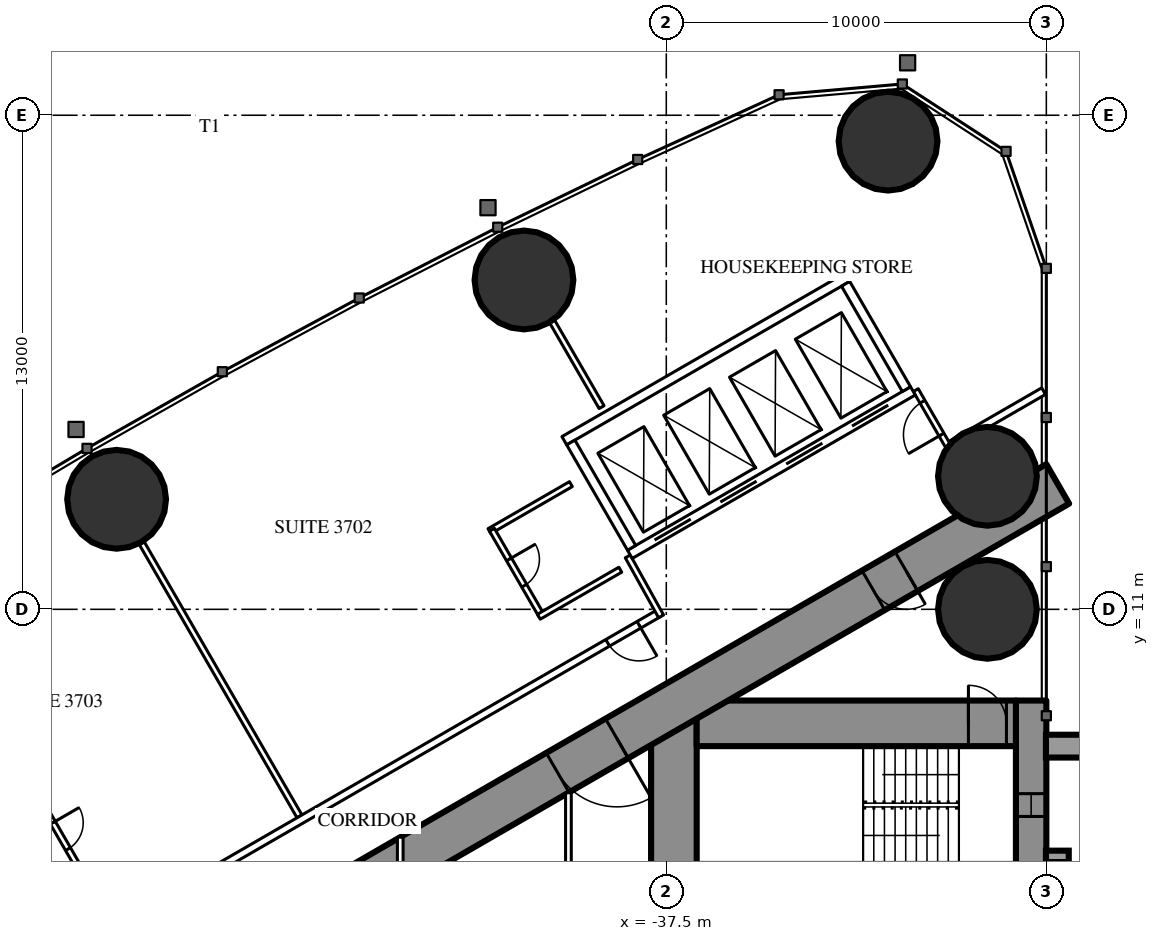
"""IFC4 building model, lengths in metres.
Left out: names, types, materials, properties, quantities, classifications, styles, units other than length and angle.
Written with IfcOpenShell. Run it as: python <this file> out.ifc"""

import sys

from ifc_helpers import new_model, si_unit, direction, frame, frame_2d, origin, origin_2d, place, context, subcontext, project, spatial, rectangle, hollow_circle, extrude, element, fill, save


model = new_model("IFC4")
c1 = context("Model", 3, precision=1e-05, world=origin(), true_north=direction((0.0, 1.0)))
c2 = subcontext(c1, "Body", "Model", "MODEL_VIEW")
j1 = project(units=[si_unit("LENGTHUNIT", "METRE"), si_unit("PLANEANGLEUNIT", "RADIAN")], contexts=[c1])
p1 = place(None, origin())
s1 = spatial("IfcSite", under=j1, at=p1, CompositionType="ELEMENT")
p2 = place(p1, origin())
s2 = spatial("IfcBuilding", under=s1, at=p2, CompositionType="ELEMENT")
p3 = place(p2, frame((0.0, 0.0, 139.6)))
s3 = spatial("IfcBuildingStorey", under=s2, at=p3, CompositionType="ELEMENT", Elevation=139.6)
for number, where, z_axis, x_axis in (
    (1, (-31.665, 23.318, 0.0), (0.0, 0.0, 1.0), (1.0, 0.0, 0.0)),
    (2, (-29.05, 11.0, 0.0), (0.0, 0.0, 1.0), (1.0, 0.0, 0.0)),
    (3, (-29.05, 14.5, 0.0), (0.0, 0.0, 1.0), (1.0, 0.0, 0.0)),
    (4, (-41.245, 19.666, 0.0), (0.0, 0.0, 1.0), (1.0, 0.0, 0.0)),
    (5, (-51.963, 13.895, 0.0), (0.0, 0.0, 1.0), (1.0, 0.0, 0.0)),
):
    element("IfcColumn", number, at=place(p3, frame(where, z_axis=z_axis, x_axis=x_axis)), inside=s3, PredefinedType="COLUMN", context=c2, shape_type="SweptSolid", body=[
        extrude(hollow_circle(Radius=1.3, WallThickness=0.1, at=origin_2d()), origin(), (0.0, 0.0, 1.0), 3.5),
    ])
p4 = place(p3, frame((-27.9, 8.6, 0.0), z_axis=(0.0, 0.0, 1.0), x_axis=(0.0, -1.0, 0.0)))
e6 = element("IfcWall", 6, at=p4, inside=s3, PredefinedType="SHEAR", context=c2, shape_type="SweptSolid", body=[
    extrude(rectangle(XDim=17.2, YDim=0.8, at=frame_2d((8.6, 0.0))), origin(), (0.0, 0.0, 1.0), 3.5),
])
p5 = place(p4, frame((2.45, 0.0, 0.6)))
e7 = element("IfcOpeningElement", 7, at=p5, cuts=e6, PredefinedType="OPENING", context=c2, shape_type="SweptSolid", body=[
    extrude(rectangle(XDim=0.6, YDim=2.1, at=frame_2d((0.3, 1.05))), frame((0.0, 0.41, 0.0), z_axis=(0.0, -1.0, 0.0), x_axis=(1.0, 0.0, 0.0)), (0.0, 0.0, 1.0), 0.82),
])
p6 = place(p4, frame((14.15, 0.0, 0.6)))
e8 = element("IfcOpeningElement", 8, at=p6, cuts=e6, PredefinedType="OPENING", context=c2, shape_type="SweptSolid", body=[
    extrude(rectangle(XDim=0.6, YDim=2.1, at=frame_2d((0.3, 1.05))), frame((0.0, 0.41, 0.0), z_axis=(0.0, -1.0, 0.0), x_axis=(1.0, 0.0, 0.0)), (0.0, 0.0, 1.0), 0.82),
])
p7 = place(p3, frame((-37.3, 8.6, 0.0), z_axis=(0.0, 0.0, 1.0), x_axis=(0.0, -1.0, 0.0)))
e9 = element("IfcWall", 9, at=p7, inside=s3, PredefinedType="SHEAR", context=c2, shape_type="SweptSolid", body=[
    extrude(rectangle(XDim=17.2, YDim=1.2, at=frame_2d((8.6, 0.0))), origin(), (0.0, 0.0, 1.0), 3.5),
])
p8 = place(p7, frame((7.7, 0.0, 0.0)))
e10 = element("IfcOpeningElement", 10, at=p8, cuts=e9, PredefinedType="OPENING", context=c2, shape_type="SweptSolid", body=[
    extrude(rectangle(XDim=1.8, YDim=2.2, at=frame_2d((0.9, 1.1))), frame((0.0, 0.61, 0.0), z_axis=(0.0, -1.0, 0.0), x_axis=(1.0, 0.0, 0.0)), (0.0, 0.0, 1.0), 1.22),
])
p9 = place(p3, frame((-28.3, 8.0, 0.0), z_axis=(0.0, 0.0, 1.0), x_axis=(-1.0, 0.0, 0.0)))
e11 = element("IfcWall", 11, at=p9, inside=s3, PredefinedType="SHEAR", context=c2, shape_type="SweptSolid", body=[
    extrude(rectangle(XDim=8.4, YDim=1.2, at=frame_2d((4.2, 0.0))), origin(), (0.0, 0.0, 1.0), 3.5),
])
p10 = place(p9, frame((0.25, 0.0, 0.0)))
e12 = element("IfcOpeningElement", 12, at=p10, cuts=e11, PredefinedType="OPENING", context=c2, shape_type="SweptSolid", body=[
    extrude(rectangle(XDim=1.0, YDim=2.2, at=frame_2d((0.5, 1.1))), frame((0.0, 0.61, 0.0), z_axis=(0.0, -1.0, 0.0), x_axis=(1.0, 0.0, 0.0)), (0.0, 0.0, 1.0), 1.22),
])
p11 = place(p3, frame((-27.2, 14.3, 0.0), z_axis=(0.0, 0.0, 1.0), x_axis=(-0.866026593062, -0.499997940104, 0.0)))
e13 = element("IfcWall", 13, at=p11, inside=s3, PredefinedType="SHEAR", context=c2, shape_type="SweptSolid", body=[
    extrude(rectangle(XDim=28.946, YDim=1.2, at=frame_2d((14.473, 0.0))), origin(), (0.0, 0.0, 1.0), 3.5),
])
p12 = place(p11, frame((4.6, 0.0, 0.0)))
e14 = element("IfcOpeningElement", 14, at=p12, cuts=e13, PredefinedType="OPENING", context=c2, shape_type="SweptSolid", body=[
    extrude(rectangle(XDim=1.0, YDim=2.2, at=frame_2d((0.5, 1.1))), frame((0.0, 0.61, 0.0), z_axis=(0.0, -1.0, 0.0), x_axis=(1.0, 0.0, 0.0)), (0.0, 0.0, 1.0), 1.22),
])
p13 = place(p11, frame((13.395, 0.0, 0.0)))
e15 = element("IfcOpeningElement", 15, at=p13, cuts=e13, PredefinedType="OPENING", context=c2, shape_type="SweptSolid", body=[
    extrude(rectangle(XDim=1.8, YDim=2.2, at=frame_2d((0.9, 1.1))), frame((0.0, 0.61, 0.0), z_axis=(0.0, -1.0, 0.0), x_axis=(1.0, 0.0, 0.0)), (0.0, 0.0, 1.0), 1.22),
])
p14 = place(p3, frame((-47.151, 5.552, 0.0), z_axis=(0.0, 0.0, 1.0), x_axis=(-0.500003012045, 0.866023664773, 0.0)))
e16 = element("IfcWall", 16, at=p14, inside=s3, PredefinedType="PARTITIONING", context=c2, shape_type="SweptSolid", body=[
    extrude(rectangle(XDim=8.311, YDim=0.15, at=frame_2d((4.156, 0.0))), origin(), (0.0, 0.0, 1.0), 2.2),
])
p15 = place(p3, frame((-39.202, 16.32, 0.0), z_axis=(0.0, 0.0, 1.0), x_axis=(-0.499947391036, 0.866055775454, 0.0)))
e17 = element("IfcWall", 17, at=p15, inside=s3, PredefinedType="PARTITIONING", context=c2, shape_type="SweptSolid", body=[
    extrude(rectangle(XDim=2.599, YDim=0.15, at=frame_2d((1.3, 0.0))), origin(), (0.0, 0.0, 1.0), 3.25),
])
p16 = place(p3, frame((-27.572, 16.741, 0.0), z_axis=(0.0, 0.0, 1.0), x_axis=(-0.866034618596, -0.499984039138, 0.0)))
e18 = element("IfcWall", 18, at=p16, inside=s3, PredefinedType="PARTITIONING", context=c2, shape_type="SweptSolid", body=[
    extrude(rectangle(XDim=2.854, YDim=0.2, at=frame_2d((1.427, 0.0))), origin(), (0.0, 0.0, 1.0), 3.25),
])
p17 = place(p3, frame((-37.7, 10.894, 0.0), z_axis=(0.0, 0.0, 1.0), x_axis=(-0.866027905338, -0.499995667157, 0.0)))
e19 = element("IfcWall", 19, at=p17, inside=s3, PredefinedType="PARTITIONING", context=c2, shape_type="SweptSolid", body=[
    extrude(rectangle(XDim=21.787, YDim=0.2, at=frame_2d((10.894, 0.0))), origin(), (0.0, 0.0, 1.0), 3.25),
])
p18 = place(p17, frame((17.711, 0.0, 0.0)))
e20 = element("IfcOpeningElement", 20, at=p18, cuts=e19, PredefinedType="OPENING", context=c2, shape_type="SweptSolid", body=[
    extrude(rectangle(XDim=0.95, YDim=2.2, at=frame_2d((0.475, 1.1))), frame((0.0, 0.11, 0.0), z_axis=(0.0, -1.0, 0.0), x_axis=(1.0, 0.0, 0.0)), (0.0, 0.0, 1.0), 0.22),
])
p19 = place(p17, frame((19.399, 0.0, 0.0)))
e21 = element("IfcOpeningElement", 21, at=p19, cuts=e19, PredefinedType="OPENING", context=c2, shape_type="SweptSolid", body=[
    extrude(rectangle(XDim=1.8, YDim=2.2, at=frame_2d((0.9, 1.1))), frame((0.0, 0.11, 0.0), z_axis=(0.0, -1.0, 0.0), x_axis=(1.0, 0.0, 0.0)), (0.0, 0.0, 1.0), 0.22),
])
p20 = place(p17, frame((0.6, 0.0, 0.0)))
e22 = element("IfcOpeningElement", 22, at=p20, cuts=e19, PredefinedType="OPENING", context=c2, shape_type="SweptSolid", body=[
    extrude(rectangle(XDim=0.95, YDim=2.2, at=frame_2d((0.475, 1.1))), frame((0.0, 0.11, 0.0), z_axis=(0.0, -1.0, 0.0), x_axis=(1.0, 0.0, 0.0)), (0.0, 0.0, 1.0), 0.22),
])
p21 = place(p3, frame((-38.513, 12.392, 0.0), z_axis=(0.0, 0.0, 1.0), x_axis=(0.485585508183, -0.874189175317, 0.0)))
e23 = element("IfcWall", 23, at=p21, inside=s3, PredefinedType="PARTITIONING", context=c2, shape_type="SweptSolid", body=[
    extrude(rectangle(XDim=1.805, YDim=0.15, at=frame_2d((0.902, 0.0))), origin(), (0.0, 0.0, 1.0), 3.25),
])
p22 = place(p3, frame((-30.033, 15.205, 0.0), z_axis=(0.0, 0.0, 1.0), x_axis=(-0.499980071345, 0.866036909293, 0.0)))
e24 = element("IfcWall", 24, at=p22, inside=s3, PredefinedType="PARTITIONING", context=c2, shape_type="SweptSolid", body=[
    extrude(rectangle(XDim=1.805, YDim=0.15, at=frame_2d((0.902, 0.0))), origin(), (0.0, 0.0, 1.0), 3.25),
])
p23 = place(p22, frame((0.452, 0.0, 0.0)))
e25 = element("IfcOpeningElement", 25, at=p23, cuts=e24, PredefinedType="OPENING", context=c2, shape_type="SweptSolid", body=[
    extrude(rectangle(XDim=1.0, YDim=2.2, at=frame_2d((0.5, 1.1))), frame((0.0, 0.085, 0.0), z_axis=(0.0, -1.0, 0.0), x_axis=(1.0, 0.0, 0.0)), (0.0, 0.0, 1.0), 0.17),
])
p24 = place(p3, frame((-52.792, 3.912, 0.0), z_axis=(0.0, 0.0, 1.0), x_axis=(-0.500006934395, 0.866021400173, 0.0)))
e26 = element("IfcWall", 26, at=p24, inside=s3, PredefinedType="PARTITIONING", context=c2, shape_type="SweptSolid", body=[
    extrude(rectangle(XDim=2.6, YDim=0.15, at=frame_2d((1.3, 0.0))), origin(), (0.0, 0.0, 1.0), 3.25),
])
p25 = place(p24, frame((0.9, 0.0, 0.0)))
e27 = element("IfcOpeningElement", 27, at=p25, cuts=e26, PredefinedType="OPENING", context=c2, shape_type="SweptSolid", body=[
    extrude(rectangle(XDim=0.8, YDim=2.2, at=frame_2d((0.4, 1.1))), frame((0.0, 0.085, 0.0), z_axis=(0.0, -1.0, 0.0), x_axis=(1.0, 0.0, 0.0)), (0.0, 0.0, 1.0), 0.17),
])
p26 = place(p3, frame((-40.01, 14.294, 0.0), z_axis=(0.0, 0.0, 1.0), x_axis=(-0.866031185235, -0.4999899861, 0.0)))
e28 = element("IfcWall", 28, at=p26, inside=s3, PredefinedType="PARTITIONING", context=c2, shape_type="SweptSolid", body=[
    extrude(rectangle(XDim=2.475, YDim=0.15, at=frame_2d((1.238, 0.0))), origin(), (0.0, 0.0, 1.0), 3.25),
])
p27 = place(p3, frame((-40.788, 10.843, 0.0), z_axis=(0.0, 0.0, 1.0), x_axis=(-0.500006934395, 0.866021400173, 0.0)))
e29 = element("IfcWall", 29, at=p27, inside=s3, PredefinedType="PARTITIONING", context=c2, shape_type="SweptSolid", body=[
    extrude(rectangle(XDim=2.6, YDim=0.15, at=frame_2d((1.3, 0.0))), origin(), (0.0, 0.0, 1.0), 3.25),
])
p28 = place(p27, frame((0.9, 0.0, 0.0)))
e30 = element("IfcOpeningElement", 30, at=p28, cuts=e29, PredefinedType="OPENING", context=c2, shape_type="SweptSolid", body=[
    extrude(rectangle(XDim=0.8, YDim=2.2, at=frame_2d((0.4, 1.1))), frame((0.0, 0.085, 0.0), z_axis=(0.0, -1.0, 0.0), x_axis=(1.0, 0.0, 0.0)), (0.0, 0.0, 1.0), 0.17),
])
p29 = place(p3, frame((-38.71, 12.042, 0.0), z_axis=(0.0, 0.0, 1.0), x_axis=(-0.86604923931, -0.499958713387, 0.0)))
e31 = element("IfcWall", 31, at=p29, inside=s3, PredefinedType="PARTITIONING", context=c2, shape_type="SweptSolid", body=[
    extrude(rectangle(XDim=2.475, YDim=0.15, at=frame_2d((1.237, 0.0))), origin(), (0.0, 0.0, 1.0), 3.25),
])
p30 = place(p3, frame((-40.075, 6.174, 0.0), z_axis=(0.0, 0.0, 1.0), x_axis=(0.0, -1.0, 0.0)))
e32 = element("IfcWall", 32, at=p30, inside=s3, PredefinedType="PARTITIONING", context=c2, shape_type="SweptSolid", body=[
    extrude(rectangle(XDim=7.374, YDim=0.15, at=frame_2d((3.687, 0.0))), origin(), (0.0, 0.0, 1.0), 3.25),
])
p31 = place(p30, frame((2.787, 0.0, 0.0)))
e33 = element("IfcOpeningElement", 33, at=p31, cuts=e32, PredefinedType="OPENING", context=c2, shape_type="SweptSolid", body=[
    extrude(rectangle(XDim=1.8, YDim=2.2, at=frame_2d((0.9, 1.1))), frame((0.0, 0.085, 0.0), z_axis=(0.0, -1.0, 0.0), x_axis=(1.0, 0.0, 0.0)), (0.0, 0.0, 1.0), 0.17),
])
p32 = place(p3, frame((-44.5, 5.005, 0.0), z_axis=(0.0, 0.0, 1.0), x_axis=(0.0, -1.0, 0.0)))
e34 = element("IfcWall", 34, at=p32, inside=s3, PredefinedType="PARTITIONING", context=c2, shape_type="SweptSolid", body=[
    extrude(rectangle(XDim=10.009, YDim=0.15, at=frame_2d((5.005, 0.0))), origin(), (0.0, 0.0, 1.0), 2.45),
])
p33 = place(p32, frame((4.505, 0.0, 0.0)))
e35 = element("IfcOpeningElement", 35, at=p33, cuts=e34, PredefinedType="OPENING", context=c2, shape_type="SweptSolid", body=[
    extrude(rectangle(XDim=1.0, YDim=2.2, at=frame_2d((0.5, 1.1))), frame((0.0, 0.085, 0.0), z_axis=(0.0, -1.0, 0.0), x_axis=(1.0, 0.0, 0.0)), (0.0, 0.0, 1.0), 0.17),
])
p34 = place(p3, frame((-31.01, 16.747, 0.0), z_axis=(0.0, 0.0, 1.0), x_axis=(-0.866028165386, -0.499995216735, 0.0)))
e36 = element("IfcWall", 36, at=p34, inside=s3, PredefinedType="PARTITIONING", context=c2, shape_type="SweptSolid", body=[
    extrude(rectangle(XDim=8.6, YDim=0.25, at=frame_2d((4.3, 0.0))), origin(), (0.0, 0.0, 1.0), 3.25),
])
p35 = place(p34, frame((0.75, 0.0, 0.0)))
e37 = element("IfcOpeningElement", 37, at=p35, cuts=e36, PredefinedType="OPENING", context=c2, shape_type="SweptSolid", body=[
    extrude(rectangle(XDim=1.1, YDim=2.2, at=frame_2d((0.55, 1.1))), frame((0.0, 0.135, 0.0), z_axis=(0.0, -1.0, 0.0), x_axis=(1.0, 0.0, 0.0)), (0.0, 0.0, 1.0), 0.27),
])
p36 = place(p34, frame((2.75, 0.0, 0.0)))
e38 = element("IfcOpeningElement", 38, at=p36, cuts=e36, PredefinedType="OPENING", context=c2, shape_type="SweptSolid", body=[
    extrude(rectangle(XDim=1.1, YDim=2.2, at=frame_2d((0.55, 1.1))), frame((0.0, 0.135, 0.0), z_axis=(0.0, -1.0, 0.0), x_axis=(1.0, 0.0, 0.0)), (0.0, 0.0, 1.0), 0.27),
])
p37 = place(p34, frame((4.75, 0.0, 0.0)))
e39 = element("IfcOpeningElement", 39, at=p37, cuts=e36, PredefinedType="OPENING", context=c2, shape_type="SweptSolid", body=[
    extrude(rectangle(XDim=1.1, YDim=2.2, at=frame_2d((0.55, 1.1))), frame((0.0, 0.135, 0.0), z_axis=(0.0, -1.0, 0.0), x_axis=(1.0, 0.0, 0.0)), (0.0, 0.0, 1.0), 0.27),
])
p38 = place(p34, frame((6.75, 0.0, 0.0)))
e40 = element("IfcOpeningElement", 40, at=p38, cuts=e36, PredefinedType="OPENING", context=c2, shape_type="SweptSolid", body=[
    extrude(rectangle(XDim=1.1, YDim=2.2, at=frame_2d((0.55, 1.1))), frame((0.0, 0.135, 0.0), z_axis=(0.0, -1.0, 0.0), x_axis=(1.0, 0.0, 0.0)), (0.0, 0.0, 1.0), 0.27),
])
p39 = place(p3, frame((-32.736, 19.736, 0.0), z_axis=(0.0, 0.0, 1.0), x_axis=(-0.866028165386, -0.499995216735, 0.0)))
e41 = element("IfcWall", 41, at=p39, inside=s3, PredefinedType="PARTITIONING", context=c2, shape_type="SweptSolid", body=[
    extrude(rectangle(XDim=8.6, YDim=0.25, at=frame_2d((4.3, 0.0))), origin(), (0.0, 0.0, 1.0), 3.25),
])
p40 = place(p3, frame((-31.181, 16.793, 0.0), z_axis=(0.0, 0.0, 1.0), x_axis=(-0.499929347863, 0.866066190972, 0.0)))
e42 = element("IfcWall", 42, at=p40, inside=s3, PredefinedType="PARTITIONING", context=c2, shape_type="SweptSolid", body=[
    extrude(rectangle(XDim=3.201, YDim=0.25, at=frame_2d((1.6, 0.0))), origin(), (0.0, 0.0, 1.0), 3.25),
])
p41 = place(p3, frame((-38.413, 12.618, 0.0), z_axis=(0.0, 0.0, 1.0), x_axis=(-0.499872130319, 0.866099216793, 0.0)))
e43 = element("IfcWall", 43, at=p41, inside=s3, PredefinedType="PARTITIONING", context=c2, shape_type="SweptSolid", body=[
    extrude(rectangle(XDim=3.2, YDim=0.25, at=frame_2d((1.6, 0.0))), origin(), (0.0, 0.0, 1.0), 3.25),
])
p42 = place(p25, origin())
e44 = element("IfcDoor", 44, at=p42, inside=s3, OperationType="SINGLE_SWING_RIGHT", PredefinedType="DOOR", context=c2, shape_type="SweptSolid", body=[
    extrude(rectangle(XDim=0.8, YDim=2.2, at=frame_2d((0.4, 1.1))), frame((0.0, 0.025, 0.0), z_axis=(0.0, -1.0, 0.0), x_axis=(1.0, 0.0, 0.0)), (0.0, 0.0, 1.0), 0.05),
])
fill(e27, e44)
p43 = place(p28, origin())
e45 = element("IfcDoor", 45, at=p43, inside=s3, OperationType="SINGLE_SWING_RIGHT", PredefinedType="DOOR", context=c2, shape_type="SweptSolid", body=[
    extrude(rectangle(XDim=0.8, YDim=2.2, at=frame_2d((0.4, 1.1))), frame((0.0, 0.025, 0.0), z_axis=(0.0, -1.0, 0.0), x_axis=(1.0, 0.0, 0.0)), (0.0, 0.0, 1.0), 0.05),
])
fill(e30, e45)
p44 = place(p20, origin())
e46 = element("IfcDoor", 46, at=p44, inside=s3, OperationType="SINGLE_SWING_LEFT", PredefinedType="DOOR", context=c2, shape_type="SweptSolid", body=[
    extrude(rectangle(XDim=0.95, YDim=2.2, at=frame_2d((0.475, 1.1))), frame((0.0, 0.025, 0.0), z_axis=(0.0, -1.0, 0.0), x_axis=(1.0, 0.0, 0.0)), (0.0, 0.0, 1.0), 0.05),
])
fill(e22, e46)
p45 = place(p23, origin())
e47 = element("IfcDoor", 47, at=p45, inside=s3, OperationType="SINGLE_SWING_LEFT", PredefinedType="DOOR", context=c2, shape_type="SweptSolid", body=[
    extrude(rectangle(XDim=1.0, YDim=2.2, at=frame_2d((0.5, 1.1))), frame((0.0, 0.025, 0.0), z_axis=(0.0, -1.0, 0.0), x_axis=(1.0, 0.0, 0.0)), (0.0, 0.0, 1.0), 0.05),
])
fill(e25, e47)
p46 = place(p12, origin())
e48 = element("IfcDoor", 48, at=p46, inside=s3, OperationType="SINGLE_SWING_LEFT", PredefinedType="DOOR", context=c2, shape_type="SweptSolid", body=[
    extrude(rectangle(XDim=1.0, YDim=2.2, at=frame_2d((0.5, 1.1))), frame((0.0, 0.025, 0.0), z_axis=(0.0, -1.0, 0.0), x_axis=(1.0, 0.0, 0.0)), (0.0, 0.0, 1.0), 0.05),
])
fill(e14, e48)
p47 = place(p13, origin())
e49 = element("IfcDoor", 49, at=p47, inside=s3, OperationType="DOUBLE_DOOR_SINGLE_SWING", PredefinedType="DOOR", context=c2, shape_type="SweptSolid", body=[
    extrude(rectangle(XDim=1.8, YDim=2.2, at=frame_2d((0.9, 1.1))), frame((0.0, 0.025, 0.0), z_axis=(0.0, -1.0, 0.0), x_axis=(1.0, 0.0, 0.0)), (0.0, 0.0, 1.0), 0.05),
])
fill(e15, e49)
p48 = place(p10, origin())
e50 = element("IfcDoor", 50, at=p48, inside=s3, OperationType="SINGLE_SWING_RIGHT", PredefinedType="DOOR", context=c2, shape_type="SweptSolid", body=[
    extrude(rectangle(XDim=1.0, YDim=2.2, at=frame_2d((0.5, 1.1))), frame((0.0, 0.025, 0.0), z_axis=(0.0, -1.0, 0.0), x_axis=(1.0, 0.0, 0.0)), (0.0, 0.0, 1.0), 0.05),
])
fill(e12, e50)
p49 = place(p35, origin())
e51 = element("IfcDoor", 51, at=p49, inside=s3, OperationType="DOUBLE_DOOR_SLIDING", PredefinedType="USERDEFINED", context=c2, shape_type="SweptSolid", body=[
    extrude(rectangle(XDim=1.1, YDim=2.2, at=frame_2d((0.55, 1.1))), frame((0.0, 0.025, 0.0), z_axis=(0.0, -1.0, 0.0), x_axis=(1.0, 0.0, 0.0)), (0.0, 0.0, 1.0), 0.05),
])
fill(e37, e51)
p50 = place(p36, origin())
e52 = element("IfcDoor", 52, at=p50, inside=s3, OperationType="DOUBLE_DOOR_SLIDING", PredefinedType="USERDEFINED", context=c2, shape_type="SweptSolid", body=[
    extrude(rectangle(XDim=1.1, YDim=2.2, at=frame_2d((0.55, 1.1))), frame((0.0, 0.025, 0.0), z_axis=(0.0, -1.0, 0.0), x_axis=(1.0, 0.0, 0.0)), (0.0, 0.0, 1.0), 0.05),
])
fill(e38, e52)
p51 = place(p37, origin())
e53 = element("IfcDoor", 53, at=p51, inside=s3, OperationType="DOUBLE_DOOR_SLIDING", PredefinedType="USERDEFINED", context=c2, shape_type="SweptSolid", body=[
    extrude(rectangle(XDim=1.1, YDim=2.2, at=frame_2d((0.55, 1.1))), frame((0.0, 0.025, 0.0), z_axis=(0.0, -1.0, 0.0), x_axis=(1.0, 0.0, 0.0)), (0.0, 0.0, 1.0), 0.05),
])
fill(e39, e53)
p52 = place(p38, origin())
e54 = element("IfcDoor", 54, at=p52, inside=s3, OperationType="DOUBLE_DOOR_SLIDING", PredefinedType="USERDEFINED", context=c2, shape_type="SweptSolid", body=[
    extrude(rectangle(XDim=1.1, YDim=2.2, at=frame_2d((0.55, 1.1))), frame((0.0, 0.025, 0.0), z_axis=(0.0, -1.0, 0.0), x_axis=(1.0, 0.0, 0.0)), (0.0, 0.0, 1.0), 0.05),
])
fill(e40, e54)
p53 = place(p5, origin())
e55 = element("IfcWindow", 55, at=p53, inside=s3, PartitioningType="SINGLE_PANEL", PredefinedType="WINDOW", context=c2, shape_type="SweptSolid", body=[
    extrude(rectangle(XDim=0.6, YDim=2.1, at=frame_2d((0.3, 1.05))), frame((0.0, 0.03, 0.0), z_axis=(0.0, -1.0, 0.0), x_axis=(1.0, 0.0, 0.0)), (0.0, 0.0, 1.0), 0.06),
])
fill(e7, e55)
save(model, sys.argv[1])
